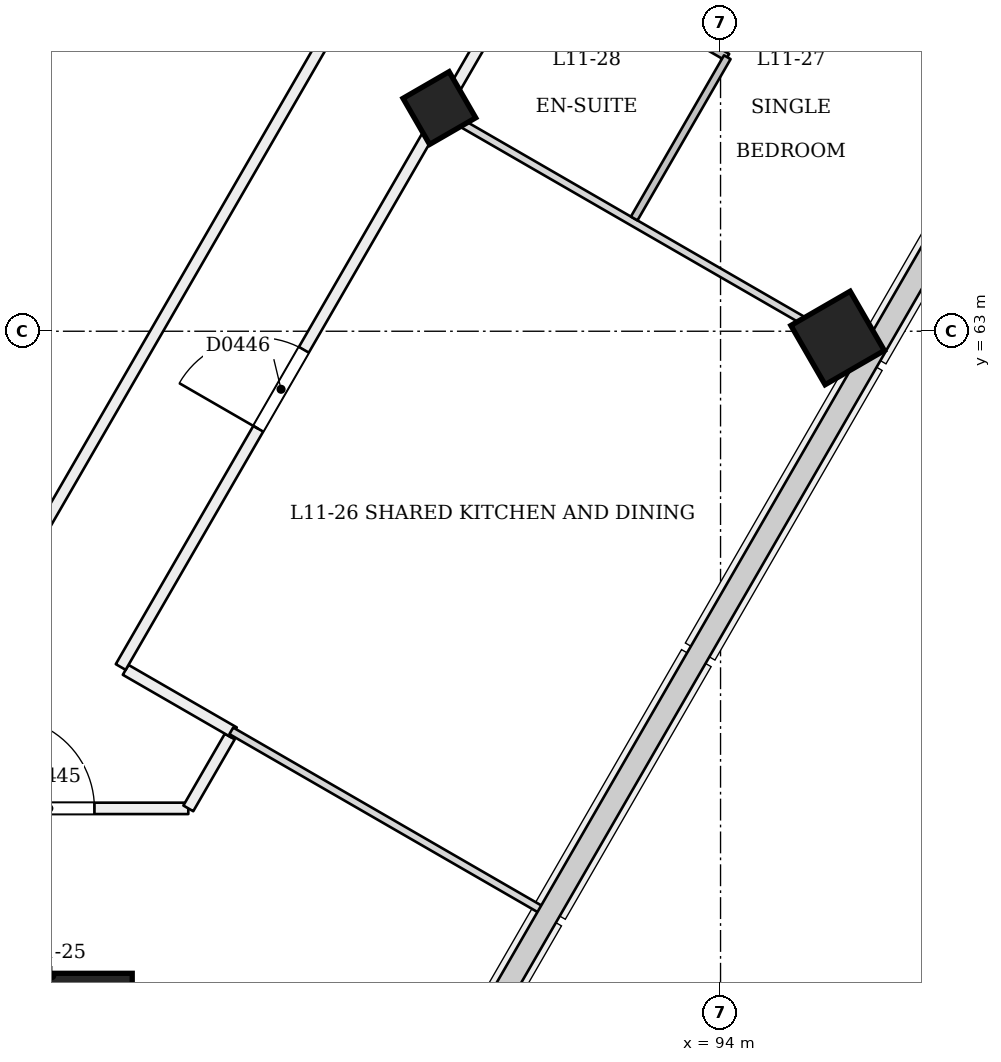
"""IFC4 building model, lengths in metres.
Left out: names, types, materials, properties, quantities, classifications, styles, units other than length and angle.
Written with IfcOpenShell. Run it as: python <this file> out.ifc"""

import sys

from ifc_helpers import new_model, si_unit, direction, frame, frame_2d, origin, origin_2d, place, context, subcontext, project, spatial, rectangle, extrude, element, fill, save


model = new_model("IFC4")
c1 = context("Model", 3, precision=1e-05, world=origin(), true_north=direction((0.0, 1.0)))
c2 = subcontext(c1, "Body", "Model", "MODEL_VIEW")
j1 = project(units=[si_unit("LENGTHUNIT", "METRE"), si_unit("PLANEANGLEUNIT", "RADIAN")], contexts=[c1])
p1 = place(None, origin())
s1 = spatial("IfcSite", under=j1, at=p1, CompositionType="ELEMENT")
p2 = place(p1, origin())
s2 = spatial("IfcBuilding", under=s1, at=p2, CompositionType="ELEMENT")
p3 = place(p2, frame((0.0, 0.0, 48.6)))
s3 = spatial("IfcBuildingStorey", under=s2, at=p3, CompositionType="ELEMENT", Elevation=48.6)
p4 = place(p3, frame((90.328, 65.889, -0.021), z_axis=(-0.022222910879, 0.038415824599, 0.999014697916), x_axis=(-0.499510298922, -0.86602370152, 0.022190305915)))
e1 = element("IfcColumn", 1, at=p4, inside=s3, PredefinedType="COLUMN", context=c2, shape_type="SweptSolid", body=[
    extrude(rectangle(XDim=0.7, YDim=0.7, at=origin_2d()), origin(), (0.0, 0.0, 1.0), 3.604),
])
p5 = place(p3, frame((85.0, 53.223, 0.0), z_axis=(0.0, 0.058360852261, 0.998295552892), x_axis=(-1.0, 0.0, 0.0)))
e2 = element("IfcColumn", 2, at=p5, inside=s3, PredefinedType="COLUMN", context=c2, shape_type="SweptSolid", body=[
    extrude(rectangle(XDim=2.52, YDim=2.52, at=origin_2d()), origin(), (0.0, 0.0, 1.0), 3.606),
])
p6 = place(p3, frame((95.567, 62.864, -0.027), z_axis=(-0.022155133694, 0.038483534979, 0.999013597298), x_axis=(-0.50131492559, -0.864979991656, 0.022202689359)))
e3 = element("IfcColumn", 3, at=p6, inside=s3, PredefinedType="COLUMN", context=c2, shape_type="SweptSolid", body=[
    extrude(rectangle(XDim=0.9, YDim=0.9, at=origin_2d()), origin(), (0.0, 0.0, 1.0), 3.604),
])
p7 = place(p3, frame((84.07, 56.723, 0.0), z_axis=(0.0, 0.0, 1.0), x_axis=(1.0, 0.0, 0.0)))
e4 = element("IfcWall", 4, at=p7, inside=s3, PredefinedType="PARTITIONING", context=c2, shape_type="SweptSolid", body=[
    extrude(rectangle(XDim=2.928, YDim=0.15, at=frame_2d((1.464, 0.0))), origin(), (0.0, 0.0, 1.0), 3.1),
])
p8 = place(p7, frame((0.493, 0.0, 0.0)))
e5 = element("IfcOpeningElement", 5, at=p8, cuts=e4, PredefinedType="OPENING", context=c2, shape_type="SweptSolid", body=[
    extrude(rectangle(XDim=1.2, YDim=2.1, at=frame_2d((0.6, 1.05))), frame((0.0, 0.085, 0.0), z_axis=(0.0, -1.0, 0.0), x_axis=(1.0, 0.0, 0.0)), (0.0, 0.0, 1.0), 0.171),
])
p9 = place(p3, frame((86.998, 56.723, 0.0), z_axis=(0.0, 0.0, 1.0), x_axis=(0.500012937857, 0.86601793398, 0.0)))
e6 = element("IfcWall", 6, at=p9, inside=s3, PredefinedType="PARTITIONING", context=c2, shape_type="SweptSolid", body=[
    extrude(rectangle(XDim=1.091, YDim=0.15, at=frame_2d((0.546, 0.0))), origin(), (0.0, 0.0, 1.0), 3.1),
])
p10 = place(p3, frame((87.598, 57.723, 0.0), z_axis=(0.0, 0.0, 1.0), x_axis=(-0.866015045157, 0.50001794124, 0.0)))
e7 = element("IfcWall", 7, at=p10, inside=s3, PredefinedType="PARTITIONING", context=c2, shape_type="SweptSolid", body=[
    extrude(rectangle(XDim=1.645, YDim=0.15, at=frame_2d((0.823, 0.0))), origin(), (0.0, 0.0, 1.0), 3.1),
])
p11 = place(p3, frame((86.109, 58.583, 0.0), z_axis=(0.0, 0.0, 1.0), x_axis=(0.499999734377, 0.866025557142, 0.0)))
e8 = element("IfcWall", 8, at=p11, inside=s3, PredefinedType="PARTITIONING", context=c2, shape_type="SweptSolid", body=[
    extrude(rectangle(XDim=39.938, YDim=0.15, at=frame_2d((19.969, 0.0))), origin(), (0.0, 0.0, 1.0), 2.7),
])
p12 = place(p11, frame((3.619, 0.0, 0.0)))
e9 = element("IfcOpeningElement", 9, at=p12, cuts=e8, PredefinedType="OPENING", context=c2, shape_type="SweptSolid", body=[
    extrude(rectangle(XDim=1.2, YDim=2.1, at=frame_2d((0.6, 1.05))), frame((0.0, 0.085, 0.0), z_axis=(0.0, -1.0, 0.0), x_axis=(1.0, 0.0, 0.0)), (0.0, 0.0, 1.0), 0.171),
])
p13 = place(p11, frame((11.217, 0.0, 0.0)))
e10 = element("IfcOpeningElement", 10, at=p13, cuts=e8, PredefinedType="OPENING", context=c2, shape_type="SweptSolid", body=[
    extrude(rectangle(XDim=1.0, YDim=2.1, at=frame_2d((0.5, 1.05))), frame((0.0, 0.085, 0.0), z_axis=(0.0, -1.0, 0.0), x_axis=(1.0, 0.0, 0.0)), (0.0, 0.0, 1.0), 0.171),
])
p14 = place(p11, frame((13.658, 0.0, 0.0)))
e11 = element("IfcOpeningElement", 11, at=p14, cuts=e8, PredefinedType="OPENING", context=c2, shape_type="SweptSolid", body=[
    extrude(rectangle(XDim=1.0, YDim=2.1, at=frame_2d((0.5, 1.05))), frame((0.0, 0.085, 0.0), z_axis=(0.0, -1.0, 0.0), x_axis=(1.0, 0.0, 0.0)), (0.0, 0.0, 1.0), 0.171),
])
p15 = place(p11, frame((20.217, 0.0, 0.0)))
e12 = element("IfcOpeningElement", 12, at=p15, cuts=e8, PredefinedType="OPENING", context=c2, shape_type="SweptSolid", body=[
    extrude(rectangle(XDim=1.0, YDim=2.1, at=frame_2d((0.5, 1.05))), frame((0.0, 0.085, 0.0), z_axis=(0.0, -1.0, 0.0), x_axis=(1.0, 0.0, 0.0)), (0.0, 0.0, 1.0), 0.171),
])
p16 = place(p11, frame((22.658, 0.0, 0.0)))
e13 = element("IfcOpeningElement", 13, at=p16, cuts=e8, PredefinedType="OPENING", context=c2, shape_type="SweptSolid", body=[
    extrude(rectangle(XDim=1.0, YDim=2.1, at=frame_2d((0.5, 1.05))), frame((0.0, 0.085, 0.0), z_axis=(0.0, -1.0, 0.0), x_axis=(1.0, 0.0, 0.0)), (0.0, 0.0, 1.0), 0.171),
])
p17 = place(p11, frame((29.217, 0.0, 0.0)))
e14 = element("IfcOpeningElement", 14, at=p17, cuts=e8, PredefinedType="OPENING", context=c2, shape_type="SweptSolid", body=[
    extrude(rectangle(XDim=1.0, YDim=2.1, at=frame_2d((0.5, 1.05))), frame((0.0, 0.085, 0.0), z_axis=(0.0, -1.0, 0.0), x_axis=(1.0, 0.0, 0.0)), (0.0, 0.0, 1.0), 0.171),
])
p18 = place(p11, frame((31.658, 0.0, 0.0)))
e15 = element("IfcOpeningElement", 15, at=p18, cuts=e8, PredefinedType="OPENING", context=c2, shape_type="SweptSolid", body=[
    extrude(rectangle(XDim=1.0, YDim=2.1, at=frame_2d((0.5, 1.05))), frame((0.0, 0.085, 0.0), z_axis=(0.0, -1.0, 0.0), x_axis=(1.0, 0.0, 0.0)), (0.0, 0.0, 1.0), 0.171),
])
p19 = place(p11, frame((38.217, 0.0, 0.0)))
e16 = element("IfcOpeningElement", 16, at=p19, cuts=e8, PredefinedType="OPENING", context=c2, shape_type="SweptSolid", body=[
    extrude(rectangle(XDim=1.0, YDim=2.1, at=frame_2d((0.5, 1.05))), frame((0.0, 0.085, 0.0), z_axis=(0.0, -1.0, 0.0), x_axis=(1.0, 0.0, 0.0)), (0.0, 0.0, 1.0), 0.171),
])
p20 = place(p3, frame((102.515, 90.6, 0.0), z_axis=(0.0, 0.0, 1.0), x_axis=(-0.499999380783, -0.866025761289, 0.0)))
e17 = element("IfcWall", 17, at=p20, inside=s3, PredefinedType="PARTITIONING", context=c2, shape_type="SweptSolid", body=[
    extrude(rectangle(XDim=34.901, YDim=0.15, at=frame_2d((17.45, 0.0))), origin(), (0.0, 0.0, 1.0), 3.1),
])
p21 = place(p20, frame((9.207, 0.0, 0.0)))
e18 = element("IfcOpeningElement", 18, at=p21, cuts=e17, PredefinedType="OPENING", context=c2, shape_type="SweptSolid", body=[
    extrude(rectangle(XDim=1.2, YDim=2.1, at=frame_2d((0.6, 1.05))), frame((0.0, 0.085, 0.0), z_axis=(0.0, -1.0, 0.0), x_axis=(1.0, 0.0, 0.0)), (0.0, 0.0, 1.0), 0.171),
])
p22 = place(p3, frame((91.669, 55.373, 0.0), z_axis=(0.0, 0.0, 1.0), x_axis=(-0.866015756104, 0.5000167099, 0.0)))
e19 = element("IfcWall", 19, at=p22, inside=s3, PredefinedType="PARTITIONING", context=c2, shape_type="SweptSolid", body=[
    extrude(rectangle(XDim=4.74, YDim=0.1, at=frame_2d((2.37, 0.0))), origin(), (0.0, 0.0, 1.0), 2.6),
])
p23 = place(p3, frame((95.87, 62.69, 0.0), z_axis=(0.0, 0.0, 1.0), x_axis=(-0.866032601554, 0.49998753289, 0.0)))
e20 = element("IfcWall", 20, at=p23, inside=s3, PredefinedType="PARTITIONING", context=c2, shape_type="SweptSolid", body=[
    extrude(rectangle(XDim=6.325, YDim=0.1, at=frame_2d((3.163, 0.0))), origin(), (0.0, 0.0, 1.0), 2.6),
])
p24 = place(p3, frame((91.642, 68.018, 0.0), z_axis=(0.0, 0.0, 1.0), x_axis=(0.866011447264, -0.500024172624, 0.0)))
e21 = element("IfcWall", 21, at=p24, inside=s3, PredefinedType="PARTITIONING", context=c2, shape_type="SweptSolid", body=[
    extrude(rectangle(XDim=2.825, YDim=0.1, at=frame_2d((1.413, 0.0))), origin(), (0.0, 0.0, 1.0), 3.1),
])
p25 = place(p24, frame((0.925, 0.0, 0.0)))
e22 = element("IfcOpeningElement", 22, at=p25, cuts=e21, PredefinedType="OPENING", context=c2, shape_type="SweptSolid", body=[
    extrude(rectangle(XDim=0.9, YDim=2.1, at=frame_2d((0.45, 1.05))), frame((0.0, 0.061, 0.0), z_axis=(0.0, -1.0, 0.0), x_axis=(1.0, 0.0, 0.0)), (0.0, 0.0, 1.0), 0.121),
])
p26 = place(p3, frame((94.089, 66.605, 0.0), z_axis=(0.0, 0.0, 1.0), x_axis=(-0.499943856944, -0.866057815567, 0.0)))
e23 = element("IfcWall", 23, at=p26, inside=s3, PredefinedType="PARTITIONING", context=c2, shape_type="SweptSolid", body=[
    extrude(rectangle(XDim=2.45, YDim=0.1, at=frame_2d((1.225, 0.0))), origin(), (0.0, 0.0, 1.0), 2.7),
])
p27 = place(p3, frame((98.137, 66.577, 0.0), z_axis=(0.0, 0.0, 1.0), x_axis=(-0.866025401434, 0.500000004071, 0.0)))
e24 = element("IfcWall", 24, at=p27, inside=s3, PredefinedType="PARTITIONING", context=c2, shape_type="SweptSolid", body=[
    extrude(rectangle(XDim=6.345, YDim=0.15, at=frame_2d((3.173, 0.0))), origin(), (0.0, 0.0, 1.0), 2.6),
])
p28 = place(p8, origin())
e25 = element("IfcDoor", 25, at=p28, inside=s3, OperationType="SINGLE_SWING_LEFT", PredefinedType="NOTDEFINED", context=c2, shape_type="SweptSolid", body=[
    extrude(rectangle(XDim=1.2, YDim=2.1, at=frame_2d((0.6, 1.05))), frame((0.0, 0.025, 0.0), z_axis=(0.0, -1.0, 0.0), x_axis=(1.0, 0.0, 0.0)), (0.0, 0.0, 1.0), 0.05),
])
fill(e5, e25)
p29 = place(p12, origin())
e26 = element("IfcDoor", 26, at=p29, inside=s3, OperationType="SINGLE_SWING_LEFT", PredefinedType="NOTDEFINED", context=c2, shape_type="SweptSolid", body=[
    extrude(rectangle(XDim=1.2, YDim=2.1, at=frame_2d((0.6, 1.05))), frame((0.0, 0.025, 0.0), z_axis=(0.0, -1.0, 0.0), x_axis=(1.0, 0.0, 0.0)), (0.0, 0.0, 1.0), 0.05),
])
fill(e9, e26)
save(model, sys.argv[1])
